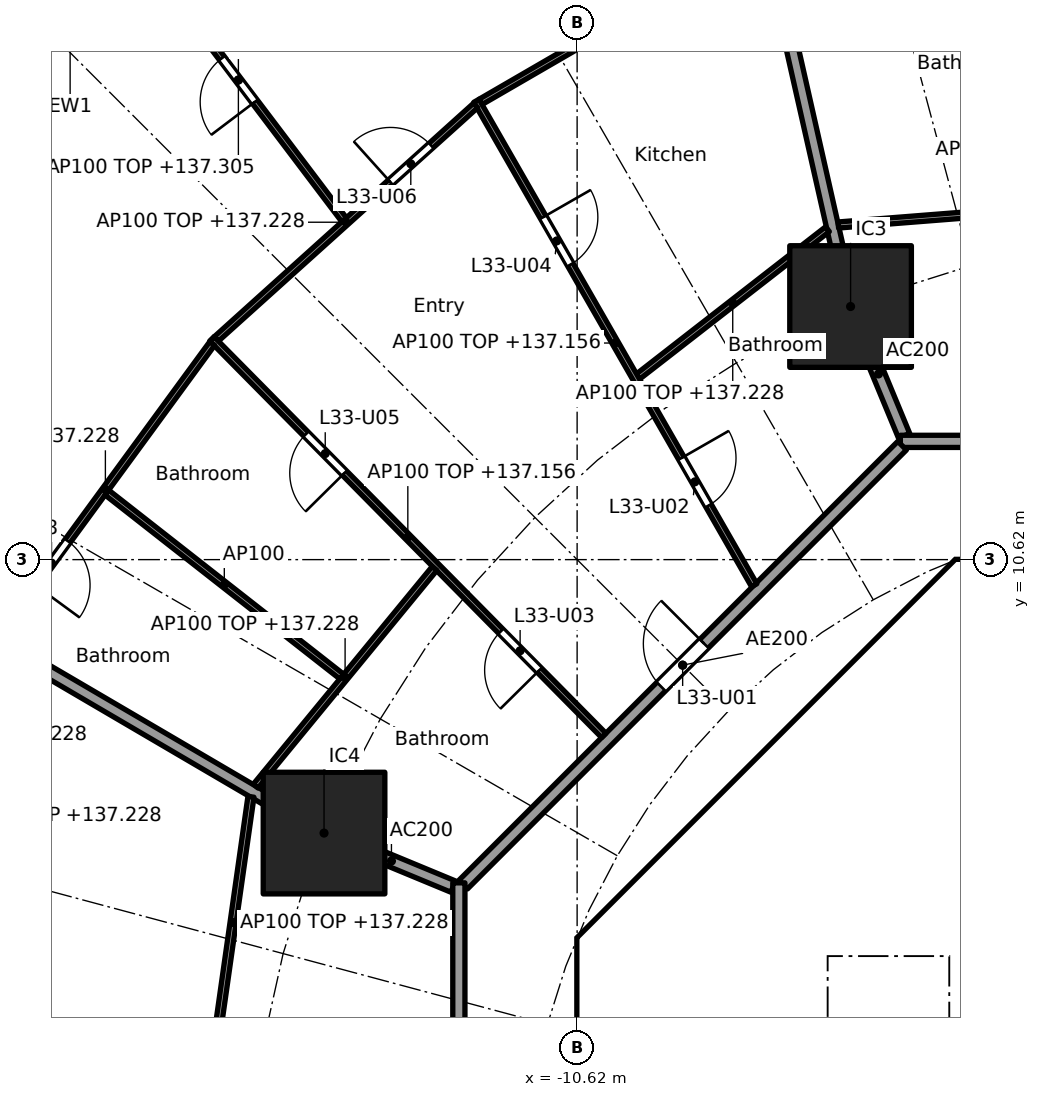
"""IFC4 building model, lengths in metres.
Left out: names, types, materials, properties, quantities, classifications, styles, units other than length and angle.
Written with IfcOpenShell. Run it as: python <this file> out.ifc"""

import sys

from ifc_helpers import new_model, si_unit, direction, frame, frame_2d, origin, origin_2d, place, context, subcontext, project, spatial, polyline, rectangle, outline, extrude, element, fill, save


model = new_model("IFC4")
c1 = context("Model", 3, precision=1e-05, world=origin(), true_north=direction((0.0, 1.0)))
c2 = subcontext(c1, "Body", "Model", "MODEL_VIEW")
j1 = project(units=[si_unit("LENGTHUNIT", "METRE"), si_unit("PLANEANGLEUNIT", "RADIAN")], contexts=[c1])
p1 = place(None, origin())
s1 = spatial("IfcSite", under=j1, at=p1, CompositionType="ELEMENT")
p2 = place(p1, origin())
s2 = spatial("IfcBuilding", under=s1, at=p2, CompositionType="ELEMENT")
p3 = place(p2, frame((0.0, 0.0, 134.4)))
s3 = spatial("IfcBuildingStorey", under=s2, at=p3, CompositionType="ELEMENT", Elevation=134.4)
for number, where, z_axis, x_axis in (
    (1, (-6.123, 14.782, 0.0), (0.0, 0.0, 1.0), (1.0, 0.0, 0.0)),
    (2, (-14.782, 6.123, 0.0), (0.0, 0.0, 1.0), (1.0, 0.0, 0.0)),
):
    element("IfcColumn", number, at=place(p3, frame(where, z_axis=z_axis, x_axis=x_axis)), inside=s3, PredefinedType="COLUMN", context=c2, shape_type="SweptSolid", body=[
        extrude(rectangle(XDim=2.0, YDim=2.0, at=origin_2d()), origin(), (0.0, 0.0, 1.0), 3.7),
    ])
p4 = place(p3, frame((-20.05, 18.569, 0.0), z_axis=(0.0, 0.0, 1.0), x_axis=(0.707857823335, 0.706354940482, 0.0)))
e3 = element("IfcWall", 3, at=p4, inside=s3, PredefinedType="SOLIDWALL", context=c2, shape_type="SweptSolid", body=[
    extrude(rectangle(XDim=3.086, YDim=0.25, at=frame_2d((1.543, 0.0))), origin(), (0.0, 0.0, 1.0), 3.44),
])
p5 = place(p4, frame((0.493, 0.0, 0.0)))
e4 = element("IfcOpeningElement", 4, at=p5, cuts=e3, PredefinedType="OPENING", context=c2, shape_type="SweptSolid", body=[
    extrude(rectangle(XDim=2.1, YDim=2.4, at=frame_2d((1.05, 1.2))), frame((0.0, 0.135, 0.0), z_axis=(0.0, -1.0, 0.0), x_axis=(1.0, 0.0, 0.0)), (0.0, 0.0, 1.0), 0.27),
])
p6 = place(p3, frame((-4.613, 9.988, 0.0), z_axis=(0.0, 0.0, 1.0), x_axis=(-0.707106781187, -0.707106781187, 0.0)))
e5 = element("IfcWall", 5, at=p6, inside=s3, PredefinedType="SHEAR", context=c2, shape_type="SweptSolid", body=[
    extrude(rectangle(XDim=7.602, YDim=0.6, at=frame_2d((3.801, 0.0))), origin(), (0.0, 0.0, 1.0), 3.44),
])
p7 = place(p6, frame((0.351, 0.0, 0.0)))
e6 = element("IfcOpeningElement", 6, at=p7, cuts=e5, PredefinedType="OPENING", context=c2, shape_type="SweptSolid", body=[
    extrude(rectangle(XDim=1.1, YDim=2.1, at=frame_2d((0.55, 1.05))), frame((0.0, 0.31, 0.0), z_axis=(0.0, -1.0, 0.0), x_axis=(1.0, 0.0, 0.0)), (0.0, 0.0, 1.0), 0.62),
])
p8 = place(p3, frame((-10.325, 3.801, 0.0), z_axis=(0.0, 0.0, 1.0), x_axis=(0.0, -1.0, 0.0)))
e7 = element("IfcWall", 7, at=p8, inside=s3, PredefinedType="SHEAR", context=c2, shape_type="SweptSolid", body=[
    extrude(rectangle(XDim=7.602, YDim=0.6, at=frame_2d((3.801, 0.0))), origin(), (0.0, 0.0, 1.0), 3.44),
])
p9 = place(p8, frame((0.651, 0.0, 0.0)))
e8 = element("IfcOpeningElement", 8, at=p9, cuts=e7, PredefinedType="OPENING", context=c2, shape_type="SweptSolid", body=[
    extrude(rectangle(XDim=1.5, YDim=2.1, at=frame_2d((0.75, 1.05))), frame((0.0, 0.31, 0.0), z_axis=(0.0, -1.0, 0.0), x_axis=(1.0, 0.0, 0.0)), (0.0, 0.0, 1.0), 0.62),
])
p10 = place(p8, frame((5.451, 0.0, 0.0)))
e9 = element("IfcOpeningElement", 9, at=p10, cuts=e7, PredefinedType="OPENING", context=c2, shape_type="SweptSolid", body=[
    extrude(rectangle(XDim=1.5, YDim=2.1, at=frame_2d((0.75, 1.05))), frame((0.0, 0.31, 0.0), z_axis=(0.0, -1.0, 0.0), x_axis=(1.0, 0.0, 0.0)), (0.0, 0.0, 1.0), 0.62),
])
p11 = place(p3, frame((-6.2, 4.3, 0.0), z_axis=(0.0, 0.0, 1.0), x_axis=(0.0, 1.0, 0.0)))
e10 = element("IfcWall", 10, at=p11, inside=s3, PredefinedType="PARTITIONING", context=c2, shape_type="SweptSolid", body=[
    extrude(rectangle(XDim=3.527, YDim=0.15, at=frame_2d((1.763, 0.0))), origin(), (0.0, 0.0, 1.0), 3.44),
])
p12 = place(p11, frame((0.262, 0.0, 0.0)))
e11 = element("IfcOpeningElement", 11, at=p12, cuts=e10, PredefinedType="OPENING", context=c2, shape_type="SweptSolid", body=[
    extrude(rectangle(XDim=0.9, YDim=2.1, at=frame_2d((0.45, 1.05))), frame((0.0, 0.085, 0.0), z_axis=(0.0, -1.0, 0.0), x_axis=(1.0, 0.0, 0.0)), (0.0, 0.0, 1.0), 0.17),
])
p13 = place(p11, frame((2.138, 0.0, 0.0)))
e12 = element("IfcOpeningElement", 12, at=p13, cuts=e10, PredefinedType="OPENING", context=c2, shape_type="SweptSolid", body=[
    extrude(rectangle(XDim=0.9, YDim=2.1, at=frame_2d((0.45, 1.05))), frame((0.0, 0.085, 0.0), z_axis=(0.0, -1.0, 0.0), x_axis=(1.0, 0.0, 0.0)), (0.0, 0.0, 1.0), 0.17),
])
p14 = place(p3, origin())
e13 = element("IfcWall", 13, at=p14, inside=s3, PredefinedType="SHEAR", context=c2, shape_type="SweptSolid", body=[
    extrude(outline(polyline([(-10.2, 4.825), (-9.776, 4.401), (-10.025, 4.152), (-10.025, 3.801), (-10.625, 3.801), (-10.625, 4.401), (-10.2, 4.825)])), origin(), (0.0, 0.0, 1.0), 3.44),
])
p15 = place(p3, origin())
e14 = element("IfcWall", 14, at=p15, inside=s3, PredefinedType="SHEAR", context=c2, shape_type="SweptSolid", body=[
    extrude(outline(polyline([(-4.152, 10.025), (-4.401, 9.776), (-4.825, 10.2), (-4.401, 10.625), (4.401, 10.625), (4.825, 10.2), (4.401, 9.776), (4.152, 10.025), (-4.152, 10.025)])), origin(), (0.0, 0.0, 1.0), 3.44),
])
p16 = place(p3, frame((-10.025, 4.0, 0.0), z_axis=(0.0, 0.0, 1.0), x_axis=(1.0, 0.0, 0.0)))
e15 = element("IfcWall", 15, at=p16, inside=s3, PredefinedType="PARTITIONING", context=c2, shape_type="SweptSolid", body=[
    extrude(rectangle(XDim=3.325, YDim=0.2, at=frame_2d((1.662, 0.0))), origin(), (0.0, 0.0, 1.0), 3.44),
])
p17 = place(p3, frame((-8.301, 5.8, 0.0), z_axis=(0.0, 0.0, 1.0), x_axis=(1.0, 0.0, 0.0)))
e16 = element("IfcWall", 16, at=p17, inside=s3, PredefinedType="PARTITIONING", context=c2, shape_type="SweptSolid", body=[
    extrude(rectangle(XDim=2.026, YDim=0.15, at=frame_2d((1.013, 0.0))), origin(), (0.0, 0.0, 1.0), 3.44),
])
p18 = place(p3, origin())
e17 = element("IfcWall", 17, at=p18, inside=s3, PredefinedType="SOLIDWALL", context=c2, shape_type="SweptSolid", body=[
    extrude(outline(polyline([(-6.5, 2.1), (-6.7, 2.1), (-6.7, 4.3), (6.7, 4.3), (6.7, 2.1), (6.5, 2.1), (6.5, 4.1), (4.5, 4.1), (4.5, 2.1), (4.3, 2.1), (4.3, 4.1), (2.3, 4.1), (2.3, 2.1), (2.1, 2.1), (2.1, 4.1), (0.1, 4.1), (0.1, 2.1), (-0.1, 2.1), (-0.1, 4.1), (-2.1, 4.1), (-2.1, 2.1), (-2.3, 2.1), (-2.3, 4.1), (-4.3, 4.1), (-4.3, 2.1), (-4.5, 2.1), (-4.5, 4.1), (-6.5, 4.1), (-6.5, 2.1)])), origin(), (0.0, 0.0, 1.0), 3.44),
])
p19 = place(p3, frame((-5.243, 12.657, 0.0), z_axis=(0.0, 0.0, 1.0), x_axis=(-0.38273085373, 0.923859888513, 0.0)))
e18 = element("IfcWall", 18, at=p19, inside=s3, PredefinedType="PARTITIONING", context=c2, shape_type="SweptSolid", body=[
    extrude(rectangle(XDim=2.199, YDim=0.2, at=frame_2d((1.1, 0.0))), origin(), (0.0, 0.0, 1.0), 3.44),
])
p20 = place(p3, frame((-6.134, 14.831, 0.0), z_axis=(0.0, 0.0, 1.0), x_axis=(-0.220337590808, 0.975423675167, 0.0)))
e19 = element("IfcWall", 19, at=p20, inside=s3, PredefinedType="PARTITIONING", context=c2, shape_type="SweptSolid", body=[
    extrude(rectangle(XDim=10.451, YDim=0.2, at=frame_2d((5.226, 0.0))), origin(), (0.0, 0.0, 1.0), 2.828),
])
p21 = place(p3, frame((-12.657, 5.243, 0.0), z_axis=(0.0, 0.0, 1.0), x_axis=(-0.923869415315, 0.382707856524, 0.0)))
e20 = element("IfcWall", 20, at=p21, inside=s3, PredefinedType="PARTITIONING", context=c2, shape_type="SweptSolid", body=[
    extrude(rectangle(XDim=2.2, YDim=0.2, at=frame_2d((1.1, 0.0))), origin(), (0.0, 0.0, 1.0), 3.44),
])
p22 = place(p3, frame((-14.825, 6.148, 0.0), z_axis=(0.0, 0.0, 1.0), x_axis=(-0.862852031662, 0.505456597006, 0.0)))
e21 = element("IfcWall", 21, at=p22, inside=s3, PredefinedType="PARTITIONING", context=c2, shape_type="SweptSolid", body=[
    extrude(rectangle(XDim=10.487, YDim=0.2, at=frame_2d((5.244, 0.0))), origin(), (0.0, 0.0, 1.0), 2.828),
])
p23 = place(p3, frame((5.104, 12.565, 0.0), z_axis=(0.0, 0.0, 1.0), x_axis=(-1.0, 0.0, 0.0)))
e22 = element("IfcWall", 22, at=p23, inside=s3, PredefinedType="PARTITIONING", context=c2, shape_type="SweptSolid", body=[
    extrude(rectangle(XDim=10.409, YDim=0.2, at=frame_2d((5.205, 0.0))), origin(), (0.0, 0.0, 1.0), 3.44),
])
p24 = place(p23, frame((4.604, 0.0, 0.0)))
e23 = element("IfcOpeningElement", 23, at=p24, cuts=e22, PredefinedType="OPENING", context=c2, shape_type="SweptSolid", body=[
    extrude(rectangle(XDim=1.0, YDim=2.1, at=frame_2d((0.5, 1.05))), frame((0.0, 0.11, 0.0), z_axis=(0.0, -1.0, 0.0), x_axis=(1.0, 0.0, 0.0)), (0.0, 0.0, 1.0), 0.22),
])
p25 = place(p3, frame((-5.275, 12.494, 0.0), z_axis=(0.0, 0.0, 1.0), x_axis=(-0.707106781187, -0.707106781187, 0.0)))
e24 = element("IfcWall", 24, at=p25, inside=s3, PredefinedType="PARTITIONING", context=c2, shape_type="SweptSolid", body=[
    extrude(rectangle(XDim=10.209, YDim=0.2, at=frame_2d((5.104, 0.0))), origin(), (0.0, 0.0, 1.0), 3.44),
])
p26 = place(p25, frame((4.604, 0.0, 0.0)))
e25 = element("IfcOpeningElement", 25, at=p26, cuts=e24, PredefinedType="OPENING", context=c2, shape_type="SweptSolid", body=[
    extrude(rectangle(XDim=1.0, YDim=2.1, at=frame_2d((0.5, 1.05))), frame((0.0, 0.11, 0.0), z_axis=(0.0, -1.0, 0.0), x_axis=(1.0, 0.0, 0.0)), (0.0, 0.0, 1.0), 0.22),
])
p27 = place(p3, frame((-12.565, 5.304, 0.0), z_axis=(0.0, 0.0, 1.0), x_axis=(0.0, -1.0, 0.0)))
e26 = element("IfcWall", 26, at=p27, inside=s3, PredefinedType="PARTITIONING", context=c2, shape_type="SweptSolid", body=[
    extrude(rectangle(XDim=10.409, YDim=0.2, at=frame_2d((5.205, 0.0))), origin(), (0.0, 0.0, 1.0), 3.44),
])
p28 = place(p3, frame((-1.802, 16.479, 0.0), z_axis=(0.0, 0.0, 1.0), x_axis=(-0.996907698294, -0.078581429625, 0.0)))
e27 = element("IfcWall", 27, at=p28, inside=s3, PredefinedType="PARTITIONING", context=c2, shape_type="SweptSolid", body=[
    extrude(rectangle(XDim=4.536, YDim=0.1, at=frame_2d((2.268, 0.0))), origin(), (0.0, 0.0, 1.0), 2.828),
])
p29 = place(p3, frame((-6.503, 16.054, 0.0), z_axis=(0.0, 0.0, 1.0), x_axis=(-0.789428807693, -0.613842127574, 0.0)))
e28 = element("IfcWall", 28, at=p29, inside=s3, PredefinedType="PARTITIONING", context=c2, shape_type="SweptSolid", body=[
    extrude(rectangle(XDim=3.948, YDim=0.1, at=frame_2d((1.974, 0.0))), origin(), (0.0, 0.0, 1.0), 2.828),
])
p30 = place(p3, frame((-7.586, 20.827, 0.0), z_axis=(0.0, 0.0, 1.0), x_axis=(-0.865093450578, -0.501610727325, 0.0)))
e29 = element("IfcWall", 29, at=p30, inside=s3, PredefinedType="PARTITIONING", context=c2, shape_type="SweptSolid", body=[
    extrude(rectangle(XDim=5.343, YDim=0.1, at=frame_2d((2.671, 0.0))), origin(), (0.0, 0.0, 1.0), 2.828),
])
p31 = place(p3, frame((-7.708, 10.198, 0.0), z_axis=(0.0, 0.0, 1.0), x_axis=(-0.497449462689, 0.867492957937, 0.0)))
e30 = element("IfcWall", 30, at=p31, inside=s3, PredefinedType="PARTITIONING", context=c2, shape_type="SweptSolid", body=[
    extrude(rectangle(XDim=9.185, YDim=0.1, at=frame_2d((4.592, 0.0))), origin(), (0.0, 0.0, 1.0), 2.756),
])
p32 = place(p31, frame((1.511, 0.0, 0.0)))
e31 = element("IfcOpeningElement", 31, at=p32, cuts=e30, PredefinedType="OPENING", context=c2, shape_type="SweptSolid", body=[
    extrude(rectangle(XDim=0.9, YDim=2.1, at=frame_2d((0.45, 1.05))), frame((0.0, 0.06, 0.0), z_axis=(0.0, -1.0, 0.0), x_axis=(1.0, 0.0, 0.0)), (0.0, 0.0, 1.0), 0.12),
])
p33 = place(p31, frame((6.078, 0.0, 0.0)))
e32 = element("IfcOpeningElement", 32, at=p33, cuts=e30, PredefinedType="OPENING", context=c2, shape_type="SweptSolid", body=[
    extrude(rectangle(XDim=0.9, YDim=2.1, at=frame_2d((0.45, 1.05))), frame((0.0, 0.06, 0.0), z_axis=(0.0, -1.0, 0.0), x_axis=(1.0, 0.0, 0.0)), (0.0, 0.0, 1.0), 0.12),
])
p34 = place(p3, frame((-12.289, 18.089, 0.0), z_axis=(0.0, 0.0, 1.0), x_axis=(-0.743146066164, -0.669129228435, 0.0)))
e33 = element("IfcWall", 33, at=p34, inside=s3, PredefinedType="PARTITIONING", context=c2, shape_type="SweptSolid", body=[
    extrude(rectangle(XDim=5.739, YDim=0.1, at=frame_2d((2.87, 0.0))), origin(), (0.0, 0.0, 1.0), 2.828),
])
p35 = place(p34, frame((0.985, 0.0, 0.0)))
e34 = element("IfcOpeningElement", 34, at=p35, cuts=e33, PredefinedType="OPENING", context=c2, shape_type="SweptSolid", body=[
    extrude(rectangle(XDim=0.9, YDim=2.1, at=frame_2d((0.45, 1.05))), frame((0.0, 0.06, 0.0), z_axis=(0.0, -1.0, 0.0), x_axis=(1.0, 0.0, 0.0)), (0.0, 0.0, 1.0), 0.12),
])
p36 = place(p3, frame((-14.452, 16.208, 0.0), z_axis=(0.0, 0.0, 1.0), x_axis=(-0.603267974074, 0.797538557975, 0.0)))
e35 = element("IfcWall", 35, at=p36, inside=s3, PredefinedType="PARTITIONING", context=c2, shape_type="SweptSolid", body=[
    extrude(rectangle(XDim=5.764, YDim=0.1, at=frame_2d((2.882, 0.0))), origin(), (0.0, 0.0, 1.0), 2.905),
])
p37 = place(p36, frame((2.432, 0.0, 0.0)))
e36 = element("IfcOpeningElement", 36, at=p37, cuts=e35, PredefinedType="OPENING", context=c2, shape_type="SweptSolid", body=[
    extrude(rectangle(XDim=0.9, YDim=2.1, at=frame_2d((0.45, 1.05))), frame((0.0, 0.06, 0.0), z_axis=(0.0, -1.0, 0.0), x_axis=(1.0, 0.0, 0.0)), (0.0, 0.0, 1.0), 0.12),
])
p38 = place(p3, frame((-10.182, 7.729, 0.0), z_axis=(0.0, 0.0, 1.0), x_axis=(-0.702927211734, 0.711261790766, 0.0)))
e37 = element("IfcWall", 37, at=p38, inside=s3, PredefinedType="PARTITIONING", context=c2, shape_type="SweptSolid", body=[
    extrude(rectangle(XDim=9.168, YDim=0.1, at=frame_2d((4.584, 0.0))), origin(), (0.0, 0.0, 1.0), 2.756),
])
p39 = place(p38, frame((1.507, 0.0, 0.0)))
e38 = element("IfcOpeningElement", 38, at=p39, cuts=e37, PredefinedType="OPENING", context=c2, shape_type="SweptSolid", body=[
    extrude(rectangle(XDim=0.9, YDim=2.1, at=frame_2d((0.45, 1.05))), frame((0.0, 0.06, 0.0), z_axis=(0.0, -1.0, 0.0), x_axis=(1.0, 0.0, 0.0)), (0.0, 0.0, 1.0), 0.12),
])
p40 = place(p38, frame((6.067, 0.0, 0.0)))
e39 = element("IfcOpeningElement", 39, at=p40, cuts=e37, PredefinedType="OPENING", context=c2, shape_type="SweptSolid", body=[
    extrude(rectangle(XDim=0.9, YDim=2.1, at=frame_2d((0.45, 1.05))), frame((0.0, 0.06, 0.0), z_axis=(0.0, -1.0, 0.0), x_axis=(1.0, 0.0, 0.0)), (0.0, 0.0, 1.0), 0.12),
])
p41 = place(p3, frame((-12.965, 10.475, 0.0), z_axis=(0.0, 0.0, 1.0), x_axis=(-0.634943961338, -0.772558195841, 0.0)))
e40 = element("IfcWall", 40, at=p41, inside=s3, PredefinedType="PARTITIONING", context=c2, shape_type="SweptSolid", body=[
    extrude(rectangle(XDim=4.632, YDim=0.1, at=frame_2d((2.316, 0.0))), origin(), (0.0, 0.0, 1.0), 2.828),
])
p42 = place(p3, frame((-16.621, 14.174, 0.0), z_axis=(0.0, 0.0, 1.0), x_axis=(-0.590674917338, -0.806909624449, 0.0)))
e41 = element("IfcWall", 41, at=p42, inside=s3, PredefinedType="PARTITIONING", context=c2, shape_type="SweptSolid", body=[
    extrude(rectangle(XDim=5.949, YDim=0.1, at=frame_2d((2.975, 0.0))), origin(), (0.0, 0.0, 1.0), 2.828),
])
p43 = place(p42, frame((4.024, 0.0, 0.0)))
e42 = element("IfcOpeningElement", 42, at=p43, cuts=e41, PredefinedType="OPENING", context=c2, shape_type="SweptSolid", body=[
    extrude(rectangle(XDim=0.9, YDim=2.1, at=frame_2d((0.45, 1.05))), frame((0.0, 0.06, 0.0), z_axis=(0.0, -1.0, 0.0), x_axis=(1.0, 0.0, 0.0)), (0.0, 0.0, 1.0), 0.12),
])
p44 = place(p3, frame((-14.491, 8.697, 0.0), z_axis=(0.0, 0.0, 1.0), x_axis=(-0.787139479951, 0.616775031193, 0.0)))
e43 = element("IfcWall", 43, at=p44, inside=s3, PredefinedType="PARTITIONING", context=c2, shape_type="SweptSolid", body=[
    extrude(rectangle(XDim=4.907, YDim=0.1, at=frame_2d((2.453, 0.0))), origin(), (0.0, 0.0, 1.0), 3.44),
])
p45 = place(p3, frame((-15.984, 6.72, 0.0), z_axis=(0.0, 0.0, 1.0), x_axis=(-0.140684869512, -0.990054426529, 0.0)))
e44 = element("IfcWall", 44, at=p45, inside=s3, PredefinedType="PARTITIONING", context=c2, shape_type="SweptSolid", body=[
    extrude(rectangle(XDim=4.177, YDim=0.1, at=frame_2d((2.088, 0.0))), origin(), (0.0, 0.0, 1.0), 2.828),
])
p46 = place(p5, origin())
e45 = element("IfcDoor", 45, at=p46, inside=s3, OperationType="SLIDING_TO_LEFT", PredefinedType="DOOR", context=c2, shape_type="SweptSolid", body=[
    extrude(rectangle(XDim=2.1, YDim=2.4, at=frame_2d((1.05, 1.2))), frame((0.0, 0.025, 0.0), z_axis=(0.0, -1.0, 0.0), x_axis=(1.0, 0.0, 0.0)), (0.0, 0.0, 1.0), 0.05),
])
fill(e4, e45)
p47 = place(p12, origin())
e46 = element("IfcDoor", 46, at=p47, inside=s3, OperationType="SINGLE_SWING_LEFT", PredefinedType="DOOR", context=c2, shape_type="SweptSolid", body=[
    extrude(rectangle(XDim=0.9, YDim=2.1, at=frame_2d((0.45, 1.05))), frame((0.0, 0.025, 0.0), z_axis=(0.0, -1.0, 0.0), x_axis=(1.0, 0.0, 0.0)), (0.0, 0.0, 1.0), 0.05),
])
fill(e11, e46)
p48 = place(p13, origin())
e47 = element("IfcDoor", 47, at=p48, inside=s3, OperationType="SINGLE_SWING_LEFT", PredefinedType="DOOR", context=c2, shape_type="SweptSolid", body=[
    extrude(rectangle(XDim=0.9, YDim=2.1, at=frame_2d((0.45, 1.05))), frame((0.0, 0.025, 0.0), z_axis=(0.0, -1.0, 0.0), x_axis=(1.0, 0.0, 0.0)), (0.0, 0.0, 1.0), 0.05),
])
fill(e12, e47)
p49 = place(p9, origin())
e48 = element("IfcDoor", 48, at=p49, inside=s3, OperationType="DOUBLE_DOOR_SINGLE_SWING", PredefinedType="DOOR", context=c2, shape_type="SweptSolid", body=[
    extrude(rectangle(XDim=1.5, YDim=2.1, at=frame_2d((0.75, 1.05))), frame((0.0, 0.025, 0.0), z_axis=(0.0, -1.0, 0.0), x_axis=(1.0, 0.0, 0.0)), (0.0, 0.0, 1.0), 0.05),
])
fill(e8, e48)
p50 = place(p7, origin())
e49 = element("IfcDoor", 49, at=p50, inside=s3, OperationType="SINGLE_SWING_LEFT", PredefinedType="DOOR", context=c2, shape_type="SweptSolid", body=[
    extrude(rectangle(XDim=1.1, YDim=2.1, at=frame_2d((0.55, 1.05))), frame((0.0, 0.025, 0.0), z_axis=(0.0, -1.0, 0.0), x_axis=(1.0, 0.0, 0.0)), (0.0, 0.0, 1.0), 0.05),
])
fill(e6, e49)
p51 = place(p26, frame((1.0, 0.0, 0.0), x_axis=(-1.0, 0.0, 0.0)))
e50 = element("IfcDoor", 50, at=p51, inside=s3, OperationType="SINGLE_SWING_RIGHT", PredefinedType="DOOR", context=c2, shape_type="SweptSolid", body=[
    extrude(rectangle(XDim=1.0, YDim=2.1, at=frame_2d((0.5, 1.05))), frame((0.0, 0.025, 0.0), z_axis=(0.0, -1.0, 0.0), x_axis=(1.0, 0.0, 0.0)), (0.0, 0.0, 1.0), 0.05),
])
fill(e25, e50)
p52 = place(p32, frame((0.9, 0.0, 0.0), x_axis=(-1.0, 0.0, 0.0)))
e51 = element("IfcDoor", 51, at=p52, inside=s3, OperationType="SINGLE_SWING_LEFT", PredefinedType="DOOR", context=c2, shape_type="SweptSolid", body=[
    extrude(rectangle(XDim=0.9, YDim=2.1, at=frame_2d((0.45, 1.05))), frame((0.0, 0.025, 0.0), z_axis=(0.0, -1.0, 0.0), x_axis=(1.0, 0.0, 0.0)), (0.0, 0.0, 1.0), 0.05),
])
fill(e31, e51)
p53 = place(p39, origin())
e52 = element("IfcDoor", 52, at=p53, inside=s3, OperationType="SINGLE_SWING_LEFT", PredefinedType="DOOR", context=c2, shape_type="SweptSolid", body=[
    extrude(rectangle(XDim=0.9, YDim=2.1, at=frame_2d((0.45, 1.05))), frame((0.0, 0.025, 0.0), z_axis=(0.0, -1.0, 0.0), x_axis=(1.0, 0.0, 0.0)), (0.0, 0.0, 1.0), 0.05),
])
fill(e38, e52)
p54 = place(p33, frame((0.9, 0.0, 0.0), x_axis=(-1.0, 0.0, 0.0)))
e53 = element("IfcDoor", 53, at=p54, inside=s3, OperationType="SINGLE_SWING_LEFT", PredefinedType="DOOR", context=c2, shape_type="SweptSolid", body=[
    extrude(rectangle(XDim=0.9, YDim=2.1, at=frame_2d((0.45, 1.05))), frame((0.0, 0.025, 0.0), z_axis=(0.0, -1.0, 0.0), x_axis=(1.0, 0.0, 0.0)), (0.0, 0.0, 1.0), 0.05),
])
fill(e32, e53)
p55 = place(p40, origin())
e54 = element("IfcDoor", 54, at=p55, inside=s3, OperationType="SINGLE_SWING_LEFT", PredefinedType="DOOR", context=c2, shape_type="SweptSolid", body=[
    extrude(rectangle(XDim=0.9, YDim=2.1, at=frame_2d((0.45, 1.05))), frame((0.0, 0.025, 0.0), z_axis=(0.0, -1.0, 0.0), x_axis=(1.0, 0.0, 0.0)), (0.0, 0.0, 1.0), 0.05),
])
fill(e39, e54)
p56 = place(p35, frame((0.9, 0.0, 0.0), x_axis=(-1.0, 0.0, 0.0)))
e55 = element("IfcDoor", 55, at=p56, inside=s3, OperationType="SINGLE_SWING_LEFT", PredefinedType="DOOR", context=c2, shape_type="SweptSolid", body=[
    extrude(rectangle(XDim=0.9, YDim=2.1, at=frame_2d((0.45, 1.05))), frame((0.0, 0.025, 0.0), z_axis=(0.0, -1.0, 0.0), x_axis=(1.0, 0.0, 0.0)), (0.0, 0.0, 1.0), 0.05),
])
fill(e34, e55)
p57 = place(p37, origin())
e56 = element("IfcDoor", 56, at=p57, inside=s3, OperationType="SINGLE_SWING_LEFT", PredefinedType="DOOR", context=c2, shape_type="SweptSolid", body=[
    extrude(rectangle(XDim=0.9, YDim=2.1, at=frame_2d((0.45, 1.05))), frame((0.0, 0.025, 0.0), z_axis=(0.0, -1.0, 0.0), x_axis=(1.0, 0.0, 0.0)), (0.0, 0.0, 1.0), 0.05),
])
fill(e36, e56)
p58 = place(p43, origin())
e57 = element("IfcDoor", 57, at=p58, inside=s3, OperationType="SINGLE_SWING_RIGHT", PredefinedType="DOOR", context=c2, shape_type="SweptSolid", body=[
    extrude(rectangle(XDim=0.9, YDim=2.1, at=frame_2d((0.45, 1.05))), frame((0.0, 0.025, 0.0), z_axis=(0.0, -1.0, 0.0), x_axis=(1.0, 0.0, 0.0)), (0.0, 0.0, 1.0), 0.05),
])
fill(e42, e57)
save(model, sys.argv[1])
